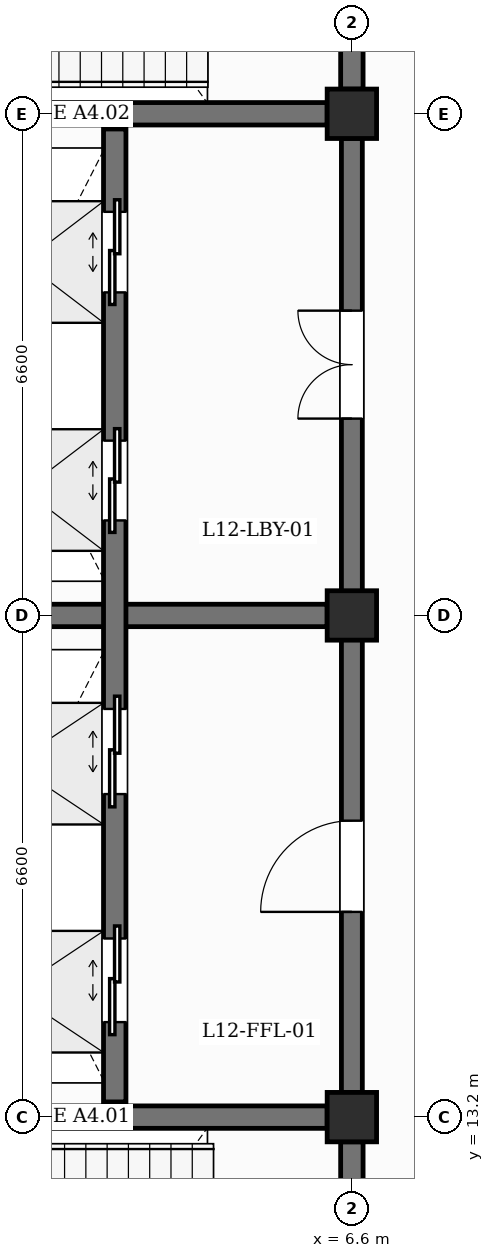
"""IFC4 building model, lengths in metres.
Left out: names, types, materials, properties, quantities, classifications, styles, units other than length and angle.
Written with IfcOpenShell. Run it as: python <this file> out.ifc"""

import sys

from ifc_helpers import new_model, si_unit, direction, frame, frame_2d, origin, origin_2d, place, context, subcontext, project, spatial, rectangle, extrude, element, fill, save


model = new_model("IFC4")
c1 = context("Model", 3, precision=1e-05, world=origin(), true_north=direction((0.0, 1.0)))
c2 = subcontext(c1, "Body", "Model", "MODEL_VIEW")
j1 = project(units=[si_unit("LENGTHUNIT", "METRE"), si_unit("PLANEANGLEUNIT", "RADIAN")], contexts=[c1])
p1 = place(None, origin())
s1 = spatial("IfcSite", under=j1, at=p1, CompositionType="ELEMENT")
p2 = place(p1, origin())
s2 = spatial("IfcBuilding", under=s1, at=p2, CompositionType="ELEMENT")
p3 = place(p2, frame((0.0, 0.0, 52.2)))
s3 = spatial("IfcBuildingStorey", under=s2, at=p3, CompositionType="ELEMENT", Elevation=52.2)
for number, where, z_axis, x_axis in (
    (1, (6.6, 13.2, 0.0), (0.0, 0.0, 1.0), (1.0, 0.0, 0.0)),
    (2, (6.6, 19.8, 0.0), (0.0, 0.0, 1.0), (1.0, 0.0, 0.0)),
    (3, (6.6, 26.4, 0.0), (0.0, 0.0, 1.0), (1.0, 0.0, 0.0)),
):
    element("IfcColumn", number, at=place(p3, frame(where, z_axis=z_axis, x_axis=x_axis)), inside=s3, PredefinedType="COLUMN", context=c2, shape_type="SweptSolid", body=[
        extrude(rectangle(XDim=0.65, YDim=0.65, at=origin_2d()), origin(), (0.0, 0.0, 1.0), 4.2),
    ])
p4 = place(p3, frame((0.325, 13.2, 0.0), z_axis=(0.0, 0.0, 1.0), x_axis=(1.0, 0.0, 0.0)))
e4 = element("IfcWall", 4, at=p4, inside=s3, PredefinedType="SHEAR", context=c2, shape_type="SweptSolid", body=[
    extrude(rectangle(XDim=5.95, YDim=0.295, at=frame_2d((2.975, 0.0))), origin(), (0.0, 0.0, 1.0), 3.3),
])
p5 = place(p3, frame((6.6, 6.925, 0.0), z_axis=(0.0, 0.0, 1.0), x_axis=(0.0, 1.0, 0.0)))
e5 = element("IfcWall", 5, at=p5, inside=s3, PredefinedType="SHEAR", context=c2, shape_type="SweptSolid", body=[
    extrude(rectangle(XDim=5.95, YDim=0.295, at=frame_2d((2.975, 0.0))), origin(), (0.0, 0.0, 1.0), 3.3),
])
p6 = place(p5, frame((2.4, 0.0, 0.0)))
e6 = element("IfcOpeningElement", 6, at=p6, cuts=e5, PredefinedType="OPENING", context=c2, shape_type="SweptSolid", body=[
    extrude(rectangle(XDim=1.15, YDim=2.2, at=frame_2d((0.575, 1.1))), frame((0.0, 0.157, 0.0), z_axis=(0.0, -1.0, 0.0), x_axis=(1.0, 0.0, 0.0)), (0.0, 0.0, 1.0), 0.315),
])
p7 = place(p3, frame((0.325, 26.4, 0.0), z_axis=(0.0, 0.0, 1.0), x_axis=(1.0, 0.0, 0.0)))
e7 = element("IfcWall", 7, at=p7, inside=s3, PredefinedType="SHEAR", context=c2, shape_type="SweptSolid", body=[
    extrude(rectangle(XDim=5.95, YDim=0.295, at=frame_2d((2.975, 0.0))), origin(), (0.0, 0.0, 1.0), 3.3),
])
p8 = place(p3, frame((6.6, 26.725, 0.0), z_axis=(0.0, 0.0, 1.0), x_axis=(0.0, 1.0, 0.0)))
e8 = element("IfcWall", 8, at=p8, inside=s3, PredefinedType="SHEAR", context=c2, shape_type="SweptSolid", body=[
    extrude(rectangle(XDim=5.95, YDim=0.295, at=frame_2d((2.975, 0.0))), origin(), (0.0, 0.0, 1.0), 3.3),
])
p9 = place(p8, frame((2.4, 0.0, 0.0)))
e9 = element("IfcOpeningElement", 9, at=p9, cuts=e8, PredefinedType="OPENING", context=c2, shape_type="SweptSolid", body=[
    extrude(rectangle(XDim=1.15, YDim=2.2, at=frame_2d((0.575, 1.1))), frame((0.0, 0.157, 0.0), z_axis=(0.0, -1.0, 0.0), x_axis=(1.0, 0.0, 0.0)), (0.0, 0.0, 1.0), 0.315),
])
p10 = place(p3, frame((0.325, 19.8, 0.0), z_axis=(0.0, 0.0, 1.0), x_axis=(1.0, 0.0, 0.0)))
e10 = element("IfcWall", 10, at=p10, inside=s3, PredefinedType="SHEAR", context=c2, shape_type="SweptSolid", body=[
    extrude(rectangle(XDim=5.95, YDim=0.295, at=frame_2d((2.975, 0.0))), origin(), (0.0, 0.0, 1.0), 3.3),
])
p11 = place(p3, frame((6.6, 13.525, 0.0), z_axis=(0.0, 0.0, 1.0), x_axis=(0.0, 1.0, 0.0)))
e11 = element("IfcWall", 11, at=p11, inside=s3, PredefinedType="SHEAR", context=c2, shape_type="SweptSolid", body=[
    extrude(rectangle(XDim=5.95, YDim=0.275, at=frame_2d((2.975, 0.0))), origin(), (0.0, 0.0, 1.0), 3.3),
])
p12 = place(p11, frame((2.375, 0.0, 0.0)))
e12 = element("IfcOpeningElement", 12, at=p12, cuts=e11, PredefinedType="OPENING", context=c2, shape_type="SweptSolid", body=[
    extrude(rectangle(XDim=1.2, YDim=2.25, at=frame_2d((0.6, 1.125))), frame((0.0, 0.147, 0.0), z_axis=(0.0, -1.0, 0.0), x_axis=(1.0, 0.0, 0.0)), (0.0, 0.0, 1.0), 0.295),
])
p13 = place(p3, frame((6.6, 20.125, 0.0), z_axis=(0.0, 0.0, 1.0), x_axis=(0.0, 1.0, 0.0)))
e13 = element("IfcWall", 13, at=p13, inside=s3, PredefinedType="SHEAR", context=c2, shape_type="SweptSolid", body=[
    extrude(rectangle(XDim=5.95, YDim=0.275, at=frame_2d((2.975, 0.0))), origin(), (0.0, 0.0, 1.0), 3.3),
])
p14 = place(p13, frame((2.265, 0.0, 0.0)))
e14 = element("IfcOpeningElement", 14, at=p14, cuts=e13, PredefinedType="OPENING", context=c2, shape_type="SweptSolid", body=[
    extrude(rectangle(XDim=1.42, YDim=2.2, at=frame_2d((0.71, 1.1))), frame((0.0, 0.147, 0.0), z_axis=(0.0, -1.0, 0.0), x_axis=(1.0, 0.0, 0.0)), (0.0, 0.0, 1.0), 0.295),
])
p15 = place(p3, frame((3.48, 13.4, 0.0), z_axis=(0.0, 0.0, 1.0), x_axis=(0.0, 1.0, 0.0)))
e15 = element("IfcWall", 15, at=p15, inside=s3, PredefinedType="SHEAR", context=c2, shape_type="SweptSolid", body=[
    extrude(rectangle(XDim=6.2, YDim=0.295, at=frame_2d((3.1, 0.0))), origin(), (0.0, 0.0, 1.0), 3.9),
])
p16 = place(p15, frame((1.05, 0.0, 0.0)))
e16 = element("IfcOpeningElement", 16, at=p16, cuts=e15, PredefinedType="OPENING", context=c2, shape_type="SweptSolid", body=[
    extrude(rectangle(XDim=1.1, YDim=2.15, at=frame_2d((0.55, 1.075))), frame((0.0, 0.157, 0.0), z_axis=(0.0, -1.0, 0.0), x_axis=(1.0, 0.0, 0.0)), (0.0, 0.0, 1.0), 0.315),
])
p17 = place(p15, frame((4.05, 0.0, 0.0)))
e17 = element("IfcOpeningElement", 17, at=p17, cuts=e15, PredefinedType="OPENING", context=c2, shape_type="SweptSolid", body=[
    extrude(rectangle(XDim=1.12, YDim=2.15, at=frame_2d((0.56, 1.075))), frame((0.0, 0.157, 0.0), z_axis=(0.0, -1.0, 0.0), x_axis=(1.0, 0.0, 0.0)), (0.0, 0.0, 1.0), 0.315),
])
p18 = place(p3, frame((3.48, 20.0, 0.0), z_axis=(0.0, 0.0, 1.0), x_axis=(0.0, 1.0, 0.0)))
e18 = element("IfcWall", 18, at=p18, inside=s3, PredefinedType="SHEAR", context=c2, shape_type="SweptSolid", body=[
    extrude(rectangle(XDim=6.2, YDim=0.295, at=frame_2d((3.1, 0.0))), origin(), (0.0, 0.0, 1.0), 3.9),
])
p19 = place(p18, frame((1.05, 0.0, 0.0)))
e19 = element("IfcOpeningElement", 19, at=p19, cuts=e18, PredefinedType="OPENING", context=c2, shape_type="SweptSolid", body=[
    extrude(rectangle(XDim=1.05, YDim=2.15, at=frame_2d((0.525, 1.075))), frame((0.0, 0.157, 0.0), z_axis=(0.0, -1.0, 0.0), x_axis=(1.0, 0.0, 0.0)), (0.0, 0.0, 1.0), 0.315),
])
p20 = place(p18, frame((4.05, 0.0, 0.0)))
e20 = element("IfcOpeningElement", 20, at=p20, cuts=e18, PredefinedType="OPENING", context=c2, shape_type="SweptSolid", body=[
    extrude(rectangle(XDim=1.06, YDim=2.15, at=frame_2d((0.53, 1.075))), frame((0.0, 0.157, 0.0), z_axis=(0.0, -1.0, 0.0), x_axis=(1.0, 0.0, 0.0)), (0.0, 0.0, 1.0), 0.315),
])
p21 = place(p16, origin())
e21 = element("IfcDoor", 21, at=p21, inside=s3, OperationType="DOUBLE_DOOR_SLIDING", PredefinedType="USERDEFINED", context=c2, shape_type="SweptSolid", body=[
    extrude(rectangle(XDim=1.1, YDim=2.15, at=frame_2d((0.55, 1.075))), frame((0.0, 0.025, 0.0), z_axis=(0.0, -1.0, 0.0), x_axis=(1.0, 0.0, 0.0)), (0.0, 0.0, 1.0), 0.05),
])
fill(e16, e21)
p22 = place(p17, origin())
e22 = element("IfcDoor", 22, at=p22, inside=s3, OperationType="DOUBLE_DOOR_SLIDING", PredefinedType="USERDEFINED", context=c2, shape_type="SweptSolid", body=[
    extrude(rectangle(XDim=1.12, YDim=2.15, at=frame_2d((0.56, 1.075))), frame((0.0, 0.025, 0.0), z_axis=(0.0, -1.0, 0.0), x_axis=(1.0, 0.0, 0.0)), (0.0, 0.0, 1.0), 0.05),
])
fill(e17, e22)
p23 = place(p19, origin())
e23 = element("IfcDoor", 23, at=p23, inside=s3, OperationType="DOUBLE_DOOR_SLIDING", PredefinedType="USERDEFINED", context=c2, shape_type="SweptSolid", body=[
    extrude(rectangle(XDim=1.05, YDim=2.15, at=frame_2d((0.525, 1.075))), frame((0.0, 0.025, 0.0), z_axis=(0.0, -1.0, 0.0), x_axis=(1.0, 0.0, 0.0)), (0.0, 0.0, 1.0), 0.05),
])
fill(e19, e23)
p24 = place(p20, origin())
e24 = element("IfcDoor", 24, at=p24, inside=s3, OperationType="DOUBLE_DOOR_SLIDING", PredefinedType="USERDEFINED", context=c2, shape_type="SweptSolid", body=[
    extrude(rectangle(XDim=1.06, YDim=2.15, at=frame_2d((0.53, 1.075))), frame((0.0, 0.025, 0.0), z_axis=(0.0, -1.0, 0.0), x_axis=(1.0, 0.0, 0.0)), (0.0, 0.0, 1.0), 0.05),
])
fill(e20, e24)
p25 = place(p12, origin())
e25 = element("IfcDoor", 25, at=p25, inside=s3, OperationType="SINGLE_SWING_LEFT", PredefinedType="DOOR", context=c2, shape_type="SweptSolid", body=[
    extrude(rectangle(XDim=1.2, YDim=2.25, at=frame_2d((0.6, 1.125))), frame((0.0, 0.025, 0.0), z_axis=(0.0, -1.0, 0.0), x_axis=(1.0, 0.0, 0.0)), (0.0, 0.0, 1.0), 0.05),
])
fill(e12, e25)
p26 = place(p14, origin())
e26 = element("IfcDoor", 26, at=p26, inside=s3, OperationType="DOUBLE_DOOR_SINGLE_SWING", PredefinedType="DOOR", context=c2, shape_type="SweptSolid", body=[
    extrude(rectangle(XDim=1.42, YDim=2.2, at=frame_2d((0.71, 1.1))), frame((0.0, 0.025, 0.0), z_axis=(0.0, -1.0, 0.0), x_axis=(1.0, 0.0, 0.0)), (0.0, 0.0, 1.0), 0.05),
])
fill(e14, e26)
save(model, sys.argv[1])
